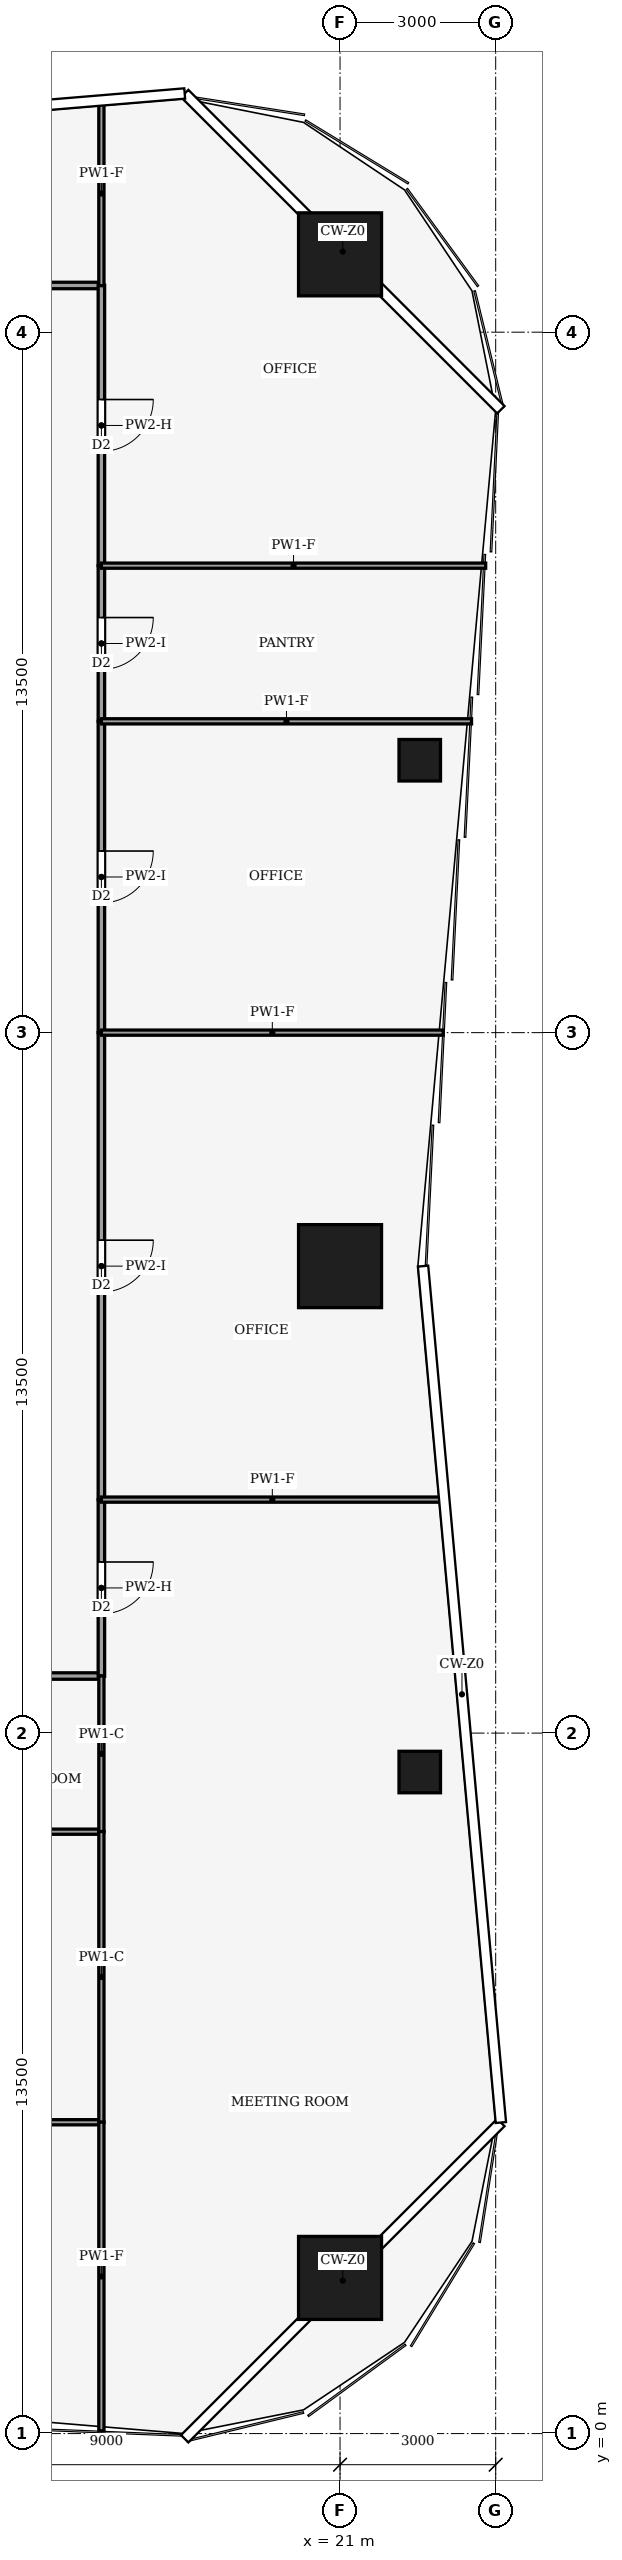
"""IFC4 building model, lengths in metres.
Left out: names, types, materials, properties, quantities, classifications, styles, units other than length and angle.
Written with IfcOpenShell. Run it as: python <this file> out.ifc"""

import sys

from ifc_helpers import new_model, si_unit, direction, frame, frame_2d, origin, origin_2d, place, context, subcontext, project, spatial, rectangle, hollow_rectangle, extrude, element, fill, save


model = new_model("IFC4")
c1 = context("Model", 3, precision=1e-05, world=origin(), true_north=direction((0.0, 1.0)))
c2 = subcontext(c1, "Body", "Model", "MODEL_VIEW")
j1 = project(units=[si_unit("LENGTHUNIT", "METRE"), si_unit("PLANEANGLEUNIT", "RADIAN")], contexts=[c1])
p1 = place(None, origin())
s1 = spatial("IfcSite", under=j1, at=p1, CompositionType="ELEMENT")
p2 = place(p1, origin())
s2 = spatial("IfcBuilding", under=s1, at=p2, CompositionType="ELEMENT")
p3 = place(p2, frame((0.0, 0.0, 34.0)))
s3 = spatial("IfcBuildingStorey", under=s2, at=p3, CompositionType="ELEMENT", Elevation=34.0)
for number, where, z_axis, x_axis in (
    (1, (21.0, 42.0, 0.0), (0.0, 0.0, 1.0), (1.0, 0.0, 0.0)),
    (2, (21.0, 22.5, 0.0), (0.0, 0.0, 1.0), (1.0, 0.0, 0.0)),
    (3, (21.0, 3.0, 0.0), (0.0, 0.0, 1.0), (1.0, 0.0, 0.0)),
):
    element("IfcColumn", number, at=place(p3, frame(where, z_axis=z_axis, x_axis=x_axis)), inside=s3, PredefinedType="COLUMN", context=c2, shape_type="SweptSolid", body=[
        extrude(hollow_rectangle(XDim=1.6, YDim=1.6, WallThickness=0.09, at=origin_2d()), origin(), (0.0, 0.0, 1.0), 4.0),
    ])
for number, where, z_axis, x_axis in (
    (4, (22.536, 12.75, 0.0), (0.0, 0.0, 1.0), (1.0, 0.0, 0.0)),
    (5, (22.536, 32.25, 0.0), (0.0, 0.0, 1.0), (1.0, 0.0, 0.0)),
):
    element("IfcColumn", number, at=place(p3, frame(where, z_axis=z_axis, x_axis=x_axis)), inside=s3, PredefinedType="COLUMN", context=c2, shape_type="SweptSolid", body=[
        extrude(hollow_rectangle(XDim=0.8, YDim=0.8, WallThickness=0.04, at=origin_2d()), origin(), (0.0, 0.0, 1.0), 4.0),
    ])
p4 = place(p3, frame((12.0, 14.6, 0.0), z_axis=(0.0, 0.0, 1.0), x_axis=(1.0, 0.0, 0.0)))
e6 = element("IfcWall", 6, at=p4, inside=s3, PredefinedType="PARTITIONING", context=c2, shape_type="SweptSolid", body=[
    extrude(rectangle(XDim=4.4, YDim=0.125, at=frame_2d((2.2, 0.0))), origin(), (0.0, 0.0, 1.0), 3.29),
])
p5 = place(p3, frame((6.0, 41.4, 0.0), z_axis=(0.0, 0.0, 1.0), x_axis=(1.0, 0.0, 0.0)))
e7 = element("IfcWall", 7, at=p5, inside=s3, PredefinedType="PARTITIONING", context=c2, shape_type="SweptSolid", body=[
    extrude(rectangle(XDim=10.4, YDim=0.125, at=frame_2d((5.2, 0.0))), origin(), (0.0, 0.0, 1.0), 3.54),
])
p6 = place(p5, frame((1.9, 0.0, 0.0)))
e8 = element("IfcOpeningElement", 8, at=p6, cuts=e7, PredefinedType="OPENING", context=c2, shape_type="SweptSolid", body=[
    extrude(rectangle(XDim=1.0, YDim=2.1, at=frame_2d((0.5, 1.05))), frame((0.0, 0.073, 0.0), z_axis=(0.0, -1.0, 0.0), x_axis=(1.0, 0.0, 0.0)), (0.0, 0.0, 1.0), 0.145),
])
p7 = place(p3, frame((16.4, 18.0, 0.0), z_axis=(0.0, 0.0, 1.0), x_axis=(0.0, -1.0, 0.0)))
e9 = element("IfcWall", 9, at=p7, inside=s3, PredefinedType="PARTITIONING", context=c2, shape_type="SweptSolid", body=[
    extrude(rectangle(XDim=3.404, YDim=0.125, at=frame_2d((1.702, 0.0))), origin(), (0.0, 0.0, 1.0), 3.14),
])
p8 = place(p7, frame((1.202, 0.0, 0.0)))
e10 = element("IfcOpeningElement", 10, at=p8, cuts=e9, PredefinedType="OPENING", context=c2, shape_type="SweptSolid", body=[
    extrude(rectangle(XDim=1.0, YDim=2.1, at=frame_2d((0.5, 1.05))), frame((0.0, 0.073, 0.0), z_axis=(0.0, -1.0, 0.0), x_axis=(1.0, 0.0, 0.0)), (0.0, 0.0, 1.0), 0.145),
])
p9 = place(p3, frame((16.4, 27.0, 0.0), z_axis=(0.0, 0.0, 1.0), x_axis=(0.0, -1.0, 0.0)))
e11 = element("IfcWall", 11, at=p9, inside=s3, PredefinedType="PARTITIONING", context=c2, shape_type="SweptSolid", body=[
    extrude(rectangle(XDim=9.0, YDim=0.125, at=frame_2d((4.5, 0.0))), origin(), (0.0, 0.0, 1.0), 3.48),
])
p10 = place(p9, frame((4.0, 0.0, 0.0)))
e12 = element("IfcOpeningElement", 12, at=p10, cuts=e11, PredefinedType="OPENING", context=c2, shape_type="SweptSolid", body=[
    extrude(rectangle(XDim=1.0, YDim=2.1, at=frame_2d((0.5, 1.05))), frame((0.0, 0.073, 0.0), z_axis=(0.0, -1.0, 0.0), x_axis=(1.0, 0.0, 0.0)), (0.0, 0.0, 1.0), 0.145),
])
p11 = place(p3, frame((16.4, 33.0, 0.0), z_axis=(0.0, 0.0, 1.0), x_axis=(0.0, -1.0, 0.0)))
e13 = element("IfcWall", 13, at=p11, inside=s3, PredefinedType="PARTITIONING", context=c2, shape_type="SweptSolid", body=[
    extrude(rectangle(XDim=6.0, YDim=0.125, at=frame_2d((3.0, 0.0))), origin(), (0.0, 0.0, 1.0), 3.48),
])
p12 = place(p11, frame((2.5, 0.0, 0.0)))
e14 = element("IfcOpeningElement", 14, at=p12, cuts=e13, PredefinedType="OPENING", context=c2, shape_type="SweptSolid", body=[
    extrude(rectangle(XDim=1.0, YDim=2.1, at=frame_2d((0.5, 1.05))), frame((0.0, 0.073, 0.0), z_axis=(0.0, -1.0, 0.0), x_axis=(1.0, 0.0, 0.0)), (0.0, 0.0, 1.0), 0.145),
])
p13 = place(p3, frame((16.4, 36.0, 0.0), z_axis=(0.0, 0.0, 1.0), x_axis=(0.0, -1.0, 0.0)))
e15 = element("IfcWall", 15, at=p13, inside=s3, PredefinedType="PARTITIONING", context=c2, shape_type="SweptSolid", body=[
    extrude(rectangle(XDim=3.0, YDim=0.125, at=frame_2d((1.5, 0.0))), origin(), (0.0, 0.0, 1.0), 3.48),
])
p14 = place(p13, frame((1.0, 0.0, 0.0)))
e16 = element("IfcOpeningElement", 16, at=p14, cuts=e15, PredefinedType="OPENING", context=c2, shape_type="SweptSolid", body=[
    extrude(rectangle(XDim=1.0, YDim=2.1, at=frame_2d((0.5, 1.05))), frame((0.0, 0.073, 0.0), z_axis=(0.0, -1.0, 0.0), x_axis=(1.0, 0.0, 0.0)), (0.0, 0.0, 1.0), 0.145),
])
p15 = place(p3, frame((16.4, 41.404, 0.0), z_axis=(0.0, 0.0, 1.0), x_axis=(0.0, -1.0, 0.0)))
e17 = element("IfcWall", 17, at=p15, inside=s3, PredefinedType="PARTITIONING", context=c2, shape_type="SweptSolid", body=[
    extrude(rectangle(XDim=5.404, YDim=0.125, at=frame_2d((2.702, 0.0))), origin(), (0.0, 0.0, 1.0), 3.14),
])
p16 = place(p15, frame((2.202, 0.0, 0.0)))
e18 = element("IfcOpeningElement", 18, at=p16, cuts=e17, PredefinedType="OPENING", context=c2, shape_type="SweptSolid", body=[
    extrude(rectangle(XDim=1.0, YDim=2.1, at=frame_2d((0.5, 1.05))), frame((0.0, 0.073, 0.0), z_axis=(0.0, -1.0, 0.0), x_axis=(1.0, 0.0, 0.0)), (0.0, 0.0, 1.0), 0.145),
])
p17 = place(p3, frame((11.996, 11.6, 0.0), z_axis=(0.0, 0.0, 1.0), x_axis=(1.0, 0.0, 0.0)))
e19 = element("IfcWall", 19, at=p17, inside=s3, PredefinedType="PARTITIONING", context=c2, shape_type="SweptSolid", body=[
    extrude(rectangle(XDim=4.404, YDim=0.1, at=frame_2d((2.202, 0.0))), origin(), (0.0, 0.0, 1.0), 3.29),
])
p18 = place(p3, frame((16.4, 11.596, 0.0), z_axis=(0.0, 0.0, 1.0), x_axis=(0.0, 1.0, 0.0)))
e20 = element("IfcWall", 20, at=p18, inside=s3, PredefinedType="PARTITIONING", context=c2, shape_type="SweptSolid", body=[
    extrude(rectangle(XDim=3.008, YDim=0.1, at=frame_2d((1.504, 0.0))), origin(), (0.0, 0.0, 1.0), 3.87),
])
p19 = place(p3, frame((16.4, 6.0, 0.0), z_axis=(0.0, 0.0, 1.0), x_axis=(-1.0, 0.0, 0.0)))
e21 = element("IfcWall", 21, at=p19, inside=s3, PredefinedType="PARTITIONING", context=c2, shape_type="SweptSolid", body=[
    extrude(rectangle(XDim=7.4, YDim=0.1, at=frame_2d((3.7, 0.0))), origin(), (0.0, 0.0, 1.0), 3.29),
])
p20 = place(p19, frame((3.2, 0.0, 0.0)))
e22 = element("IfcOpeningElement", 22, at=p20, cuts=e21, PredefinedType="OPENING", context=c2, shape_type="SweptSolid", body=[
    extrude(rectangle(XDim=1.0, YDim=2.1, at=frame_2d((0.5, 1.05))), frame((0.0, 0.06, 0.0), z_axis=(0.0, -1.0, 0.0), x_axis=(1.0, 0.0, 0.0)), (0.0, 0.0, 1.0), 0.12),
])
p21 = place(p3, frame((16.4, 5.996, 0.0), z_axis=(0.0, 0.0, 1.0), x_axis=(0.0, 1.0, 0.0)))
e23 = element("IfcWall", 23, at=p21, inside=s3, PredefinedType="PARTITIONING", context=c2, shape_type="SweptSolid", body=[
    extrude(rectangle(XDim=5.608, YDim=0.1, at=frame_2d((2.804, 0.0))), origin(), (0.0, 0.0, 1.0), 3.87),
])
p22 = place(p3, frame((16.4, 0.053, 0.0), z_axis=(0.0, 0.0, 1.0), x_axis=(0.0, 1.0, 0.0)))
e24 = element("IfcWall", 24, at=p22, inside=s3, PredefinedType="PARTITIONING", context=c2, shape_type="SweptSolid", body=[
    extrude(rectangle(XDim=5.951, YDim=0.1, at=frame_2d((2.975, 0.0))), origin(), (0.0, 0.0, 1.0), 3.04),
])
p23 = place(p3, frame((16.4, 41.396, 0.0), z_axis=(0.0, 0.0, 1.0), x_axis=(0.0, 1.0, 0.0)))
e25 = element("IfcWall", 25, at=p23, inside=s3, PredefinedType="PARTITIONING", context=c2, shape_type="SweptSolid", body=[
    extrude(rectangle(XDim=3.551, YDim=0.1, at=frame_2d((1.775, 0.0))), origin(), (0.0, 0.0, 1.0), 3.04),
])
for number, where, z_axis, x_axis in (
    (26, (22.989, 18.0, 0.0), (0.0, 0.0, 1.0), (-1.0, 0.0, 0.0)),
    (27, (22.989, 27.0, 0.0), (0.0, 0.0, 1.0), (-1.0, 0.0, 0.0)),
):
    element("IfcWall", number, at=place(p3, frame(where, z_axis=z_axis, x_axis=x_axis)), inside=s3, PredefinedType="PARTITIONING", context=c2, shape_type="SweptSolid", body=[
        extrude(rectangle(XDim=6.589, YDim=0.1, at=frame_2d((3.294, 0.0))), origin(), (0.0, 0.0, 1.0), 3.04),
    ])
p24 = place(p3, frame((23.534, 33.0, 0.0), z_axis=(0.0, 0.0, 1.0), x_axis=(-1.0, 0.0, 0.0)))
e28 = element("IfcWall", 28, at=p24, inside=s3, PredefinedType="PARTITIONING", context=c2, shape_type="SweptSolid", body=[
    extrude(rectangle(XDim=7.135, YDim=0.1, at=frame_2d((3.567, 0.0))), origin(), (0.0, 0.0, 1.0), 3.04),
])
p25 = place(p3, frame((23.807, 36.0, 0.0), z_axis=(0.0, 0.0, 1.0), x_axis=(-1.0, 0.0, 0.0)))
e29 = element("IfcWall", 29, at=p25, inside=s3, PredefinedType="PARTITIONING", context=c2, shape_type="SweptSolid", body=[
    extrude(rectangle(XDim=7.407, YDim=0.1, at=frame_2d((3.704, 0.0))), origin(), (0.0, 0.0, 1.0), 3.04),
])
p26 = place(p8, origin())
e30 = element("IfcDoor", 30, at=p26, inside=s3, OperationType="SINGLE_SWING_LEFT", PredefinedType="DOOR", context=c2, shape_type="SweptSolid", body=[
    extrude(rectangle(XDim=1.0, YDim=2.1, at=frame_2d((0.5, 1.05))), frame((0.0, 0.025, 0.0), z_axis=(0.0, -1.0, 0.0), x_axis=(1.0, 0.0, 0.0)), (0.0, 0.0, 1.0), 0.05),
])
fill(e10, e30)
p27 = place(p10, origin())
e31 = element("IfcDoor", 31, at=p27, inside=s3, OperationType="SINGLE_SWING_RIGHT", PredefinedType="DOOR", context=c2, shape_type="SweptSolid", body=[
    extrude(rectangle(XDim=1.0, YDim=2.1, at=frame_2d((0.5, 1.05))), frame((0.0, 0.025, 0.0), z_axis=(0.0, -1.0, 0.0), x_axis=(1.0, 0.0, 0.0)), (0.0, 0.0, 1.0), 0.05),
])
fill(e12, e31)
p28 = place(p12, origin())
e32 = element("IfcDoor", 32, at=p28, inside=s3, OperationType="SINGLE_SWING_LEFT", PredefinedType="DOOR", context=c2, shape_type="SweptSolid", body=[
    extrude(rectangle(XDim=1.0, YDim=2.1, at=frame_2d((0.5, 1.05))), frame((0.0, 0.025, 0.0), z_axis=(0.0, -1.0, 0.0), x_axis=(1.0, 0.0, 0.0)), (0.0, 0.0, 1.0), 0.05),
])
fill(e14, e32)
p29 = place(p14, origin())
e33 = element("IfcDoor", 33, at=p29, inside=s3, OperationType="SINGLE_SWING_RIGHT", PredefinedType="DOOR", context=c2, shape_type="SweptSolid", body=[
    extrude(rectangle(XDim=1.0, YDim=2.1, at=frame_2d((0.5, 1.05))), frame((0.0, 0.025, 0.0), z_axis=(0.0, -1.0, 0.0), x_axis=(1.0, 0.0, 0.0)), (0.0, 0.0, 1.0), 0.05),
])
fill(e16, e33)
p30 = place(p16, origin())
e34 = element("IfcDoor", 34, at=p30, inside=s3, OperationType="SINGLE_SWING_LEFT", PredefinedType="DOOR", context=c2, shape_type="SweptSolid", body=[
    extrude(rectangle(XDim=1.0, YDim=2.1, at=frame_2d((0.5, 1.05))), frame((0.0, 0.025, 0.0), z_axis=(0.0, -1.0, 0.0), x_axis=(1.0, 0.0, 0.0)), (0.0, 0.0, 1.0), 0.05),
])
fill(e18, e34)
save(model, sys.argv[1])
